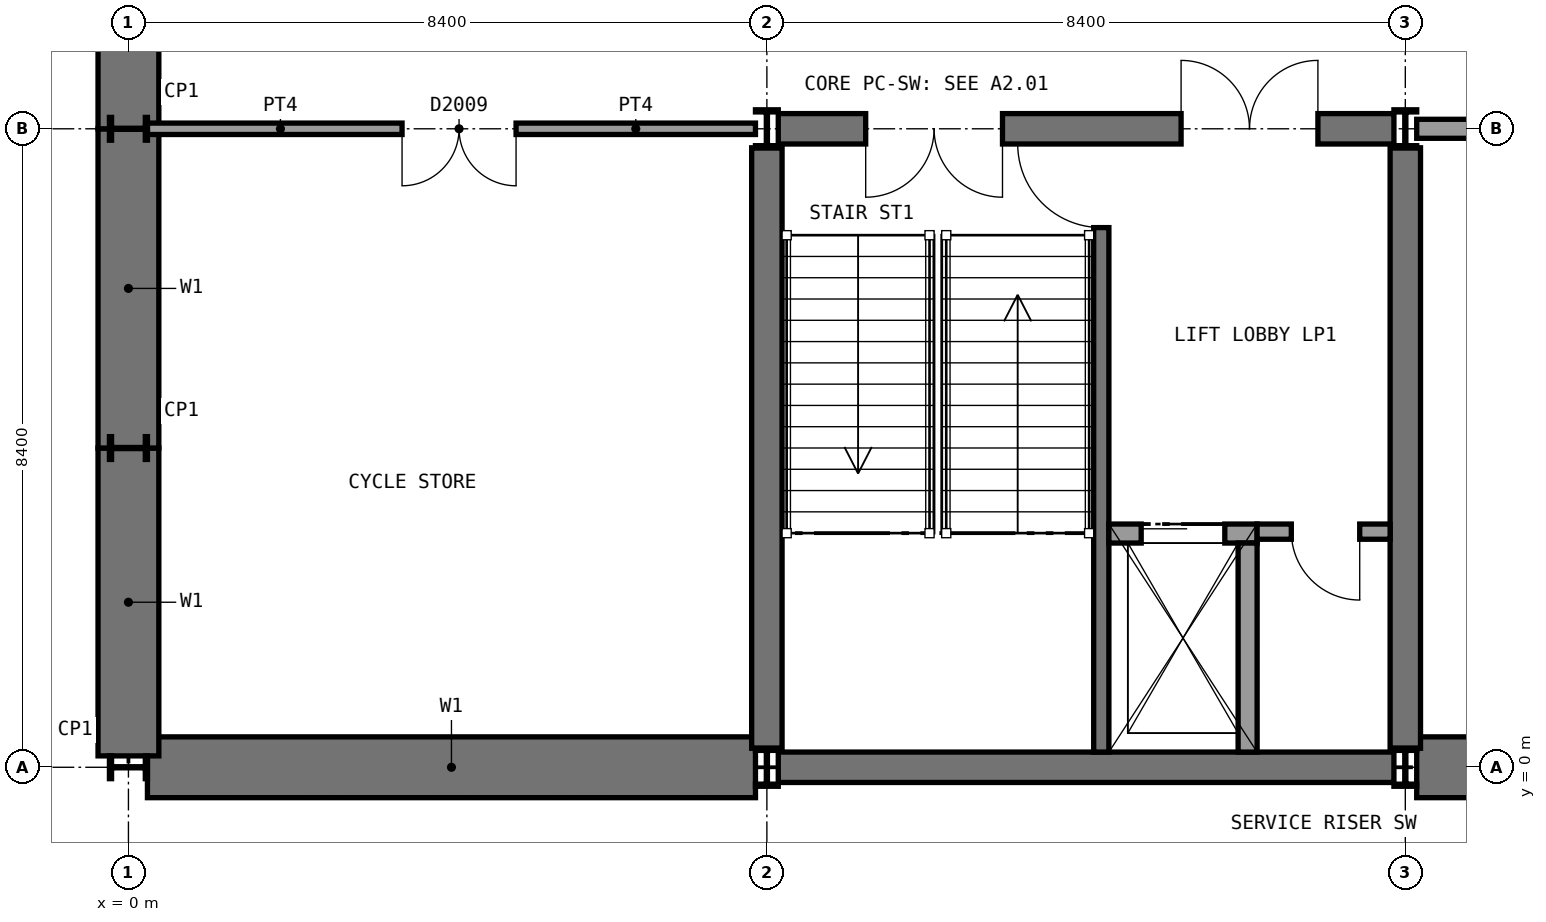
"""IFC4 building model, lengths in metres.
Left out: names, types, materials, properties, quantities, classifications, styles, units other than length and angle.
Written with IfcOpenShell. Run it as: python <this file> out.ifc"""

import sys

from ifc_helpers import new_model, si_unit, direction, frame, frame_2d, origin, origin_2d, place, context, subcontext, project, spatial, rectangle, i_section, extrude, element, fill, save


model = new_model("IFC4")
c1 = context("Model", 3, precision=1e-05, world=origin(), true_north=direction((0.0, 1.0)))
c2 = subcontext(c1, "Body", "Model", "MODEL_VIEW")
j1 = project(units=[si_unit("LENGTHUNIT", "METRE"), si_unit("PLANEANGLEUNIT", "RADIAN")], contexts=[c1])
p1 = place(None, origin())
s1 = spatial("IfcSite", under=j1, at=p1, CompositionType="ELEMENT")
p2 = place(p1, origin())
s2 = spatial("IfcBuilding", under=s1, at=p2, CompositionType="ELEMENT")
p3 = place(p2, frame((0.0, 0.0, -9.9)))
s3 = spatial("IfcBuildingStorey", under=s2, at=p3, CompositionType="ELEMENT", Elevation=-9.9)
p4 = place(p3, frame((0.25, 0.0, 0.0), z_axis=(0.0, 0.0, 1.0), x_axis=(1.0, 0.0, 0.0)))
e1 = element("IfcWall", 1, at=p4, inside=s3, PredefinedType="SOLIDWALL", context=c2, shape_type="SweptSolid", body=[
    extrude(rectangle(XDim=8.0, YDim=0.8, at=frame_2d((4.0, 0.0))), origin(), (0.0, 0.0, 1.0), 4.65),
])
p5 = place(p3, frame((16.95, 0.0, 0.0), z_axis=(0.0, 0.0, 1.0), x_axis=(1.0, 0.0, 0.0)))
e2 = element("IfcWall", 2, at=p5, inside=s3, PredefinedType="SOLIDWALL", context=c2, shape_type="SweptSolid", body=[
    extrude(rectangle(XDim=8.25, YDim=0.8, at=frame_2d((4.125, 0.0))), origin(), (0.0, 0.0, 1.0), 4.65),
])
p6 = place(p3, frame((0.0, 0.15, 0.0), z_axis=(0.0, 0.0, 1.0), x_axis=(0.0, 1.0, 0.0)))
e3 = element("IfcWall", 3, at=p6, inside=s3, PredefinedType="SOLIDWALL", context=c2, shape_type="SweptSolid", body=[
    extrude(rectangle(XDim=4.05, YDim=0.8, at=frame_2d((2.025, 0.0))), origin(), (0.0, 0.0, 1.0), 4.65),
])
p7 = place(p3, frame((0.0, 4.2, 0.0), z_axis=(0.0, 0.0, 1.0), x_axis=(0.0, 1.0, 0.0)))
e4 = element("IfcWall", 4, at=p7, inside=s3, PredefinedType="SOLIDWALL", context=c2, shape_type="SweptSolid", body=[
    extrude(rectangle(XDim=4.2, YDim=0.8, at=frame_2d((2.1, 0.0))), origin(), (0.0, 0.0, 1.0), 4.65),
])
p8 = place(p3, frame((0.0, 8.4, 0.0), z_axis=(0.0, 0.0, 1.0), x_axis=(0.0, 1.0, 0.0)))
e5 = element("IfcWall", 5, at=p8, inside=s3, PredefinedType="SOLIDWALL", context=c2, shape_type="SweptSolid", body=[
    extrude(rectangle(XDim=4.2, YDim=0.8, at=frame_2d((2.1, 0.0))), origin(), (0.0, 0.0, 1.0), 4.65),
])
p9 = place(p3, frame((8.55, 0.0, 0.0), z_axis=(0.0, 0.0, 1.0), x_axis=(1.0, 0.0, 0.0)))
e6 = element("IfcWall", 6, at=p9, inside=s3, PredefinedType="SHEAR", context=c2, shape_type="SweptSolid", body=[
    extrude(rectangle(XDim=8.1, YDim=0.4, at=frame_2d((4.05, 0.0))), origin(), (0.0, 0.0, 1.0), 4.65),
])
p10 = place(p3, frame((8.55, 8.4, 0.0), z_axis=(0.0, 0.0, 1.0), x_axis=(1.0, 0.0, 0.0)))
e7 = element("IfcWall", 7, at=p10, inside=s3, PredefinedType="SHEAR", context=c2, shape_type="SweptSolid", body=[
    extrude(rectangle(XDim=8.1, YDim=0.4, at=frame_2d((4.05, 0.0))), origin(), (0.0, 0.0, 1.0), 4.65),
])
p11 = place(p10, frame((1.15, 0.0, 0.0)))
e8 = element("IfcOpeningElement", 8, at=p11, cuts=e7, PredefinedType="OPENING", context=c2, shape_type="SweptSolid", body=[
    extrude(rectangle(XDim=1.8, YDim=2.1, at=frame_2d((0.9, 1.05))), frame((0.0, 0.21, 0.0), z_axis=(0.0, -1.0, 0.0), x_axis=(1.0, 0.0, 0.0)), (0.0, 0.0, 1.0), 0.42),
])
p12 = place(p10, frame((5.3, 0.0, 0.0)))
e9 = element("IfcOpeningElement", 9, at=p12, cuts=e7, PredefinedType="OPENING", context=c2, shape_type="SweptSolid", body=[
    extrude(rectangle(XDim=1.8, YDim=2.1, at=frame_2d((0.9, 1.05))), frame((0.0, 0.21, 0.0), z_axis=(0.0, -1.0, 0.0), x_axis=(1.0, 0.0, 0.0)), (0.0, 0.0, 1.0), 0.42),
])
for number, where, z_axis, x_axis in (
    (10, (8.4, 0.25, 0.0), (0.0, 0.0, 1.0), (0.0, 1.0, 0.0)),
    (11, (16.8, 0.25, 0.0), (0.0, 0.0, 1.0), (0.0, 1.0, 0.0)),
):
    element("IfcWall", number, at=place(p3, frame(where, z_axis=z_axis, x_axis=x_axis)), inside=s3, PredefinedType="SHEAR", context=c2, shape_type="SweptSolid", body=[
        extrude(rectangle(XDim=7.9, YDim=0.4, at=frame_2d((3.95, 0.0))), origin(), (0.0, 0.0, 1.0), 4.65),
    ])
for number, where, z_axis, x_axis in (
    (12, (0.0, 0.0, 0.0), (0.0, 0.0, 1.0), (0.0, 1.0, 0.0)),
    (13, (0.0, 4.2, 0.0), (0.0, 0.0, 1.0), (0.0, 1.0, 0.0)),
    (14, (0.0, 8.4, 0.0), (0.0, 0.0, 1.0), (0.0, 1.0, 0.0)),
    (15, (8.4, 0.0, 0.0), (0.0, 0.0, 1.0), (1.0, 0.0, 0.0)),
    (16, (8.4, 8.4, 0.0), (0.0, 0.0, 1.0), (1.0, 0.0, 0.0)),
    (17, (16.8, 0.0, 0.0), (0.0, 0.0, 1.0), (1.0, 0.0, 0.0)),
    (18, (16.8, 8.4, 0.0), (0.0, 0.0, 1.0), (1.0, 0.0, 0.0)),
):
    element("IfcColumn", number, at=place(p3, frame(where, z_axis=z_axis, x_axis=x_axis)), inside=s3, PredefinedType="COLUMN", context=c2, shape_type="SweptSolid", body=[
        extrude(i_section(OverallWidth=0.3, OverallDepth=0.5, WebThickness=0.014, FlangeThickness=0.028, FilletRadius=0.027, at=origin_2d()), origin(), (0.0, 0.0, 1.0), 5.0),
    ])
p13 = place(p3, frame((0.25, 8.4, 0.0), z_axis=(0.0, 0.0, 1.0), x_axis=(1.0, 0.0, 0.0)))
e19 = element("IfcWall", 19, at=p13, inside=s3, PredefinedType="SOLIDWALL", context=c2, shape_type="SweptSolid", body=[
    extrude(rectangle(XDim=8.0, YDim=0.15, at=frame_2d((4.0, 0.0))), origin(), (0.0, 0.0, 1.0), 4.65),
])
p14 = place(p13, frame((3.35, 0.0, 0.0)))
e20 = element("IfcOpeningElement", 20, at=p14, cuts=e19, PredefinedType="OPENING", context=c2, shape_type="SweptSolid", body=[
    extrude(rectangle(XDim=1.5, YDim=2.1, at=frame_2d((0.75, 1.05))), frame((0.0, 0.085, 0.0), z_axis=(0.0, -1.0, 0.0), x_axis=(1.0, 0.0, 0.0)), (0.0, 0.0, 1.0), 0.17),
])
p15 = place(p3, frame((16.95, 8.4, 0.0), z_axis=(0.0, 0.0, 1.0), x_axis=(1.0, 0.0, 0.0)))
e21 = element("IfcWall", 21, at=p15, inside=s3, PredefinedType="SOLIDWALL", context=c2, shape_type="SweptSolid", body=[
    extrude(rectangle(XDim=8.1, YDim=0.25, at=frame_2d((4.05, 0.0))), origin(), (0.0, 0.0, 1.0), 4.65),
])
p16 = place(p15, frame((3.35, 0.0, 0.0)))
e22 = element("IfcOpeningElement", 22, at=p16, cuts=e21, PredefinedType="OPENING", context=c2, shape_type="SweptSolid", body=[
    extrude(rectangle(XDim=1.6, YDim=2.2, at=frame_2d((0.8, 1.1))), frame((0.0, 0.135, 0.0), z_axis=(0.0, -1.0, 0.0), x_axis=(1.0, 0.0, 0.0)), (0.0, 0.0, 1.0), 0.27),
])
p17 = place(p3, frame((12.8, 0.2, 0.0), z_axis=(0.0, 0.0, 1.0), x_axis=(0.0, 1.0, 0.0)))
e23 = element("IfcWall", 23, at=p17, inside=s3, PredefinedType="SHEAR", context=c2, shape_type="SweptSolid", body=[
    extrude(rectangle(XDim=8.0, YDim=0.2, at=frame_2d((4.0, 0.0))), origin(), (0.0, 0.0, 1.0), 4.65),
])
p18 = place(p17, frame((6.9, 0.0, 0.0)))
e24 = element("IfcOpeningElement", 24, at=p18, cuts=e23, PredefinedType="OPENING", context=c2, shape_type="SweptSolid", body=[
    extrude(rectangle(XDim=1.11, YDim=2.1, at=frame_2d((0.555, 1.05))), frame((0.0, 0.11, 0.0), z_axis=(0.0, -1.0, 0.0), x_axis=(1.0, 0.0, 0.0)), (0.0, 0.0, 1.0), 0.22),
])
p19 = place(p3, frame((12.9, 3.075, -1.4), z_axis=(0.0, 0.0, 1.0), x_axis=(1.0, 0.0, 0.0)))
e25 = element("IfcWall", 25, at=p19, inside=s3, PredefinedType="SOLIDWALL", context=c2, shape_type="SweptSolid", body=[
    extrude(rectangle(XDim=1.95, YDim=0.25, at=frame_2d((0.975, 0.0))), origin(), (0.0, 0.0, 1.0), 6.4),
])
p20 = place(p19, frame((0.425, 0.0, 1.4)))
e26 = element("IfcOpeningElement", 26, at=p20, cuts=e25, PredefinedType="OPENING", context=c2, shape_type="SweptSolid", body=[
    extrude(rectangle(XDim=1.1, YDim=2.1, at=frame_2d((0.55, 1.05))), frame((0.0, 0.135, 0.0), z_axis=(0.0, -1.0, 0.0), x_axis=(1.0, 0.0, 0.0)), (0.0, 0.0, 1.0), 0.27),
])
p21 = place(p3, frame((14.725, 0.2, -1.4), z_axis=(0.0, 0.0, 1.0), x_axis=(0.0, 1.0, 0.0)))
e27 = element("IfcWall", 27, at=p21, inside=s3, PredefinedType="SOLIDWALL", context=c2, shape_type="SweptSolid", body=[
    extrude(rectangle(XDim=2.75, YDim=0.25, at=frame_2d((1.375, 0.0))), origin(), (0.0, 0.0, 1.0), 6.4),
])
p22 = place(p3, frame((14.85, 3.1, 0.0), z_axis=(0.0, 0.0, 1.0), x_axis=(1.0, 0.0, 0.0)))
e28 = element("IfcWall", 28, at=p22, inside=s3, PredefinedType="PARTITIONING", context=c2, shape_type="SweptSolid", body=[
    extrude(rectangle(XDim=1.75, YDim=0.2, at=frame_2d((0.875, 0.0))), origin(), (0.0, 0.0, 1.0), 4.65),
])
p23 = place(p22, frame((0.45, 0.0, 0.0)))
e29 = element("IfcOpeningElement", 29, at=p23, cuts=e28, PredefinedType="OPENING", context=c2, shape_type="SweptSolid", body=[
    extrude(rectangle(XDim=0.9, YDim=2.1, at=frame_2d((0.45, 1.05))), frame((0.0, 0.11, 0.0), z_axis=(0.0, -1.0, 0.0), x_axis=(1.0, 0.0, 0.0)), (0.0, 0.0, 1.0), 0.22),
])
p24 = place(p14, frame((1.5, 0.0, 0.0), z_axis=(0.0, 0.0, 1.0), x_axis=(-1.0, 0.0, 0.0)))
e30 = element("IfcDoor", 30, at=p24, inside=s3, OperationType="DOUBLE_DOOR_SINGLE_SWING", PredefinedType="DOOR", context=c2, shape_type="SweptSolid", body=[
    extrude(rectangle(XDim=1.5, YDim=2.1, at=frame_2d((0.75, 1.05))), frame((0.0, 0.025, 0.0), z_axis=(0.0, -1.0, 0.0), x_axis=(1.0, 0.0, 0.0)), (0.0, 0.0, 1.0), 0.05),
])
fill(e20, e30)
p25 = place(p18, origin())
e31 = element("IfcDoor", 31, at=p25, inside=s3, OperationType="SINGLE_SWING_RIGHT", PredefinedType="DOOR", context=c2, shape_type="SweptSolid", body=[
    extrude(rectangle(XDim=1.1, YDim=2.1, at=frame_2d((0.55, 1.05))), frame((0.0, 0.025, 0.0), z_axis=(0.0, -1.0, 0.0), x_axis=(1.0, 0.0, 0.0)), (0.0, 0.0, 1.0), 0.05),
])
fill(e24, e31)
p26 = place(p20, origin())
e32 = element("IfcDoor", 32, at=p26, inside=s3, OperationType="SLIDING_TO_LEFT", PredefinedType="DOOR", context=c2, shape_type="SweptSolid", body=[
    extrude(rectangle(XDim=1.1, YDim=2.1, at=frame_2d((0.55, 1.05))), frame((0.0, 0.025, 0.0), z_axis=(0.0, -1.0, 0.0), x_axis=(1.0, 0.0, 0.0)), (0.0, 0.0, 1.0), 0.05),
])
fill(e26, e32)
p27 = place(p23, frame((0.9, 0.0, 0.0), z_axis=(0.0, 0.0, 1.0), x_axis=(-1.0, 0.0, 0.0)))
e33 = element("IfcDoor", 33, at=p27, inside=s3, OperationType="SINGLE_SWING_LEFT", PredefinedType="DOOR", context=c2, shape_type="SweptSolid", body=[
    extrude(rectangle(XDim=0.9, YDim=2.1, at=frame_2d((0.45, 1.05))), frame((0.0, 0.025, 0.0), z_axis=(0.0, -1.0, 0.0), x_axis=(1.0, 0.0, 0.0)), (0.0, 0.0, 1.0), 0.05),
])
fill(e29, e33)
p28 = place(p11, frame((1.8, 0.0, 0.0), z_axis=(0.0, 0.0, 1.0), x_axis=(-1.0, 0.0, 0.0)))
e34 = element("IfcDoor", 34, at=p28, inside=s3, OperationType="DOUBLE_DOOR_SINGLE_SWING", PredefinedType="DOOR", context=c2, shape_type="SweptSolid", body=[
    extrude(rectangle(XDim=1.8, YDim=2.1, at=frame_2d((0.9, 1.05))), frame((0.0, 0.025, 0.0), z_axis=(0.0, -1.0, 0.0), x_axis=(1.0, 0.0, 0.0)), (0.0, 0.0, 1.0), 0.05),
])
fill(e8, e34)
p29 = place(p12, origin())
e35 = element("IfcDoor", 35, at=p29, inside=s3, OperationType="DOUBLE_DOOR_SINGLE_SWING", PredefinedType="DOOR", context=c2, shape_type="SweptSolid", body=[
    extrude(rectangle(XDim=1.8, YDim=2.1, at=frame_2d((0.9, 1.05))), frame((0.0, 0.025, 0.0), z_axis=(0.0, -1.0, 0.0), x_axis=(1.0, 0.0, 0.0)), (0.0, 0.0, 1.0), 0.05),
])
fill(e9, e35)
save(model, sys.argv[1])
